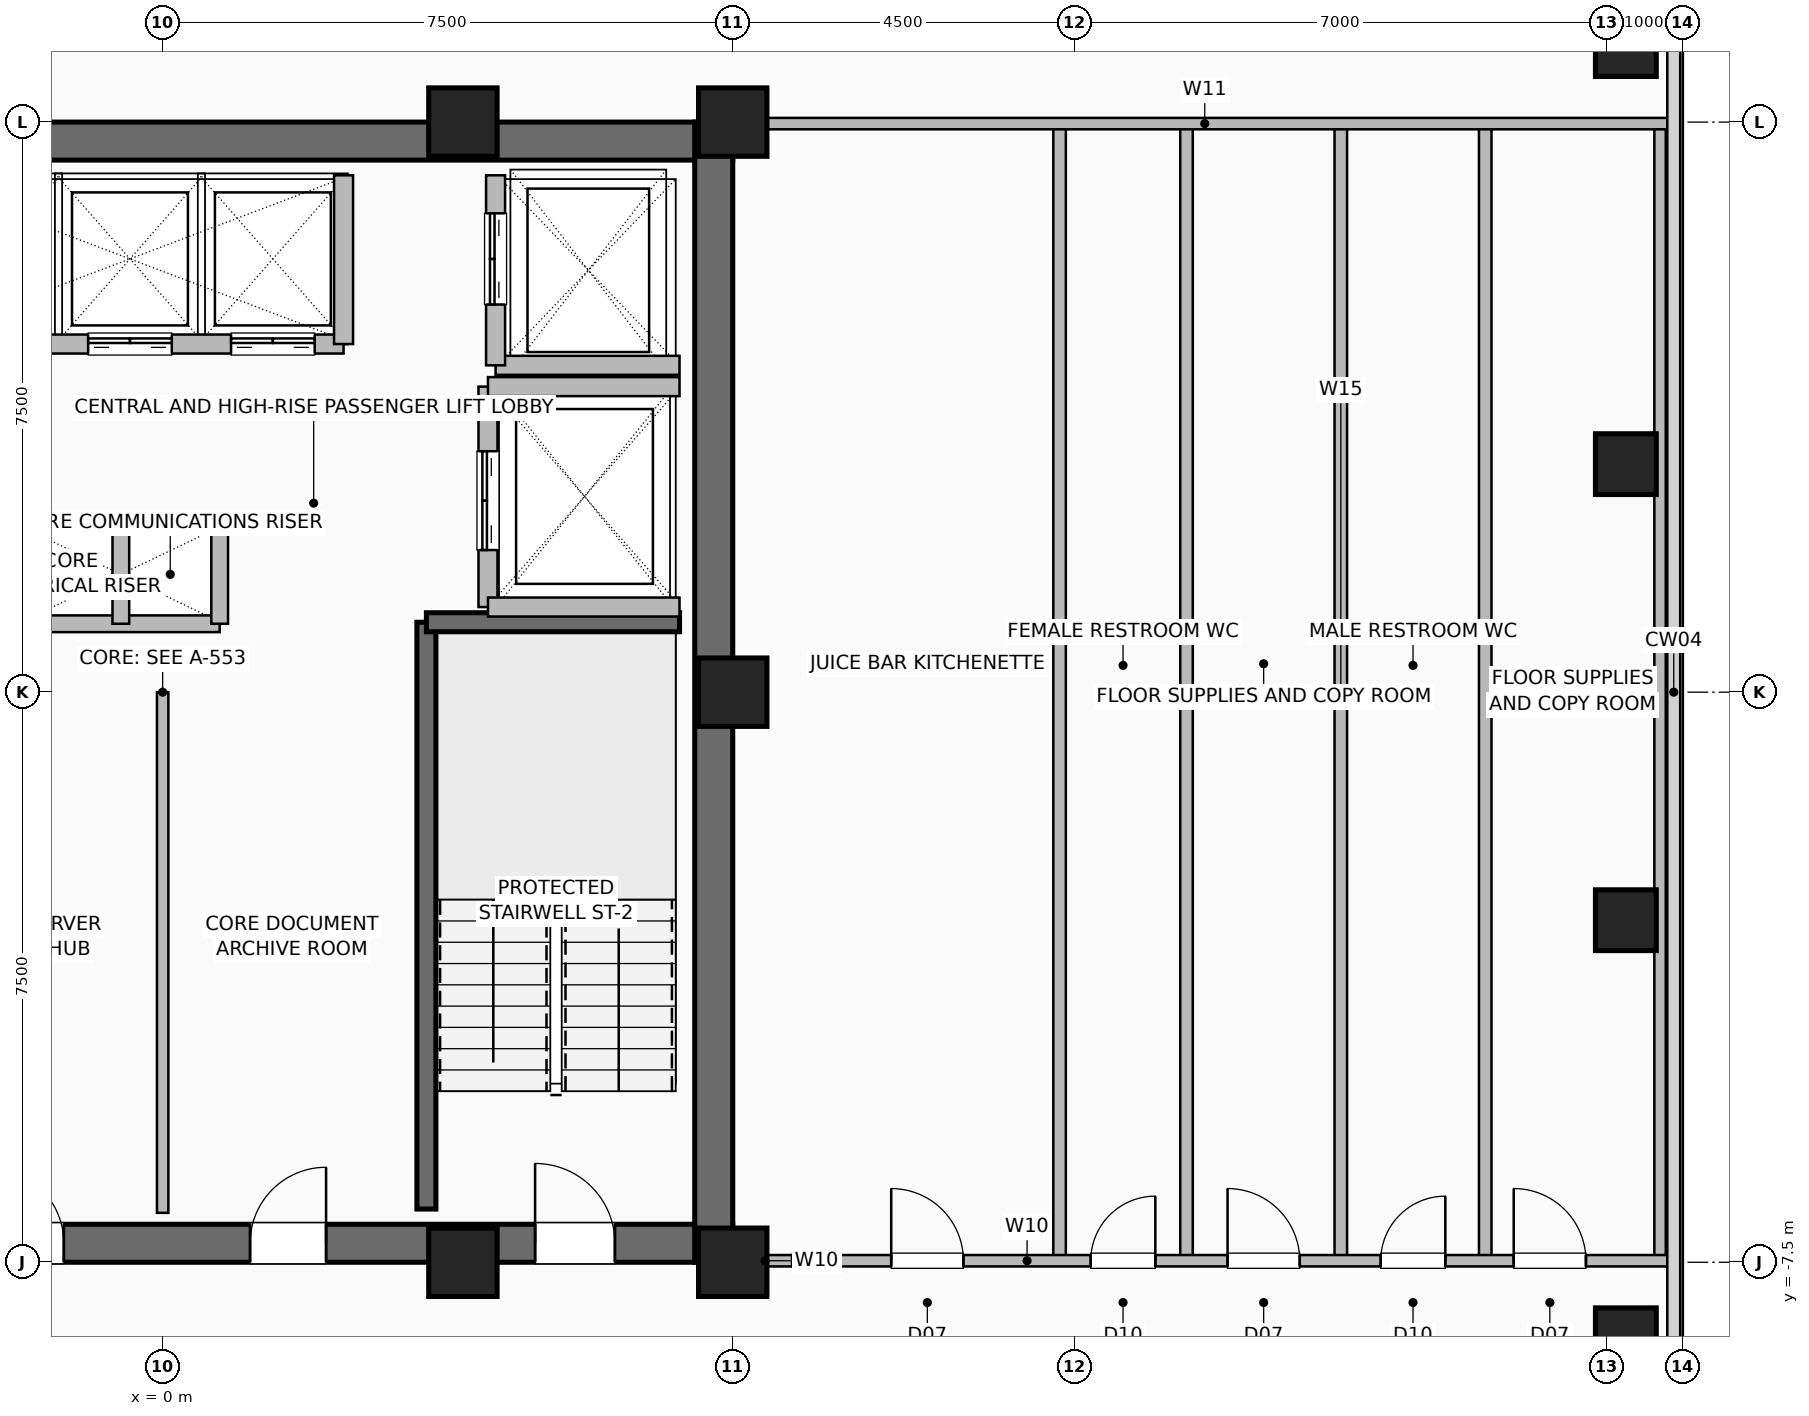
"""IFC4 building model, lengths in metres.
Left out: names, types, materials, properties, quantities, classifications, styles, units other than length and angle.
Written with IfcOpenShell. Run it as: python <this file> out.ifc"""

import sys

from ifc_helpers import new_model, si_unit, direction, frame, frame_2d, origin, origin_2d, place, context, subcontext, project, spatial, rectangle, hollow_rectangle, extrude, element, fill, save


model = new_model("IFC4")
c1 = context("Model", 3, precision=1e-05, world=origin(), true_north=direction((0.0, 1.0)))
c2 = subcontext(c1, "Body", "Model", "MODEL_VIEW")
j1 = project(units=[si_unit("LENGTHUNIT", "METRE"), si_unit("PLANEANGLEUNIT", "RADIAN")], contexts=[c1])
p1 = place(None, origin())
s1 = spatial("IfcSite", under=j1, at=p1, CompositionType="ELEMENT")
p2 = place(p1, origin())
s2 = spatial("IfcBuilding", under=s1, at=p2, CompositionType="ELEMENT")
p3 = place(p2, frame((0.0, 0.0, 209.4)))
s3 = spatial("IfcBuildingStorey", under=s2, at=p3, CompositionType="ELEMENT", Elevation=209.4)
for number, where, z_axis, x_axis in (
    (1, (3.95, -7.5, 0.0), (0.0, 0.0, 1.0), (1.0, 0.0, 0.0)),
    (2, (7.5, -7.5, 0.0), (0.0, 0.0, 1.0), (1.0, 0.0, 0.0)),
    (3, (7.5, 0.0, 0.0), (0.0, 0.0, 1.0), (1.0, 0.0, 0.0)),
    (4, (7.5, 7.5, 0.0), (0.0, 0.0, 1.0), (1.0, 0.0, 0.0)),
    (5, (3.95, 7.5, 0.0), (0.0, 0.0, 1.0), (1.0, 0.0, 0.0)),
):
    element("IfcColumn", number, at=place(p3, frame(where, z_axis=z_axis, x_axis=x_axis)), inside=s3, PredefinedType="COLUMN", context=c2, shape_type="SweptSolid", body=[
        extrude(hollow_rectangle(XDim=0.9, YDim=0.9, WallThickness=0.045, at=origin_2d()), origin(), (0.0, 0.0, 1.0), 3.6),
    ])
for number, where, z_axis, x_axis in (
    (6, (19.25, -8.5, 0.0), (0.0, 0.0, 1.0), (1.0, 0.0, 0.0)),
    (7, (19.25, -3.0, 0.0), (0.0, 0.0, 1.0), (1.0, 0.0, 0.0)),
    (8, (19.25, 3.0, 0.0), (0.0, 0.0, 1.0), (1.0, 0.0, 0.0)),
    (9, (19.25, 8.5, 0.0), (0.0, 0.0, 1.0), (1.0, 0.0, 0.0)),
):
    element("IfcColumn", number, at=place(p3, frame(where, z_axis=z_axis, x_axis=x_axis)), inside=s3, PredefinedType="COLUMN", context=c2, shape_type="SweptSolid", body=[
        extrude(hollow_rectangle(XDim=0.8, YDim=0.8, WallThickness=0.04, at=origin_2d()), origin(), (0.0, 0.0, 1.0), 3.6),
    ])
p4 = place(p3, frame((-7.5, -7.25, 0.0), z_axis=(0.0, 0.0, 1.0), x_axis=(1.0, 0.0, 0.0)))
e10 = element("IfcWall", 10, at=p4, inside=s3, PredefinedType="SHEAR", context=c2, shape_type="SweptSolid", body=[
    extrude(rectangle(XDim=15.0, YDim=0.5, at=frame_2d((7.5, 0.0))), origin(), (0.0, 0.0, 1.0), 3.36),
])
p5 = place(p4, frame((1.55, 0.0, 0.0)))
e11 = element("IfcOpeningElement", 11, at=p5, cuts=e10, PredefinedType="OPENING", context=c2, shape_type="SweptSolid", body=[
    extrude(rectangle(XDim=1.05, YDim=2.08, at=frame_2d((0.525, 1.04))), frame((0.0, 0.26, 0.0), z_axis=(0.0, -1.0, 0.0), x_axis=(1.0, 0.0, 0.0)), (0.0, 0.0, 1.0), 0.52),
])
p6 = place(p4, frame((12.4, 0.0, 0.0)))
e12 = element("IfcOpeningElement", 12, at=p6, cuts=e10, PredefinedType="OPENING", context=c2, shape_type="SweptSolid", body=[
    extrude(rectangle(XDim=1.05, YDim=2.08, at=frame_2d((0.525, 1.04))), frame((0.0, 0.26, 0.0), z_axis=(0.0, -1.0, 0.0), x_axis=(1.0, 0.0, 0.0)), (0.0, 0.0, 1.0), 0.52),
])
p7 = place(p4, frame((5.2, 0.0, 0.0)))
e13 = element("IfcOpeningElement", 13, at=p7, cuts=e10, PredefinedType="OPENING", context=c2, shape_type="SweptSolid", body=[
    extrude(rectangle(XDim=1.0, YDim=2.08, at=frame_2d((0.5, 1.04))), frame((0.0, 0.26, 0.0), z_axis=(0.0, -1.0, 0.0), x_axis=(1.0, 0.0, 0.0)), (0.0, 0.0, 1.0), 0.52),
])
p8 = place(p4, frame((8.65, 0.0, 0.0)))
e14 = element("IfcOpeningElement", 14, at=p8, cuts=e10, PredefinedType="OPENING", context=c2, shape_type="SweptSolid", body=[
    extrude(rectangle(XDim=1.0, YDim=2.08, at=frame_2d((0.5, 1.04))), frame((0.0, 0.26, 0.0), z_axis=(0.0, -1.0, 0.0), x_axis=(1.0, 0.0, 0.0)), (0.0, 0.0, 1.0), 0.52),
])
for number, where, z_axis, x_axis in (
    (15, (-7.5, 7.25, 0.0), (0.0, 0.0, 1.0), (1.0, 0.0, 0.0)),
    (16, (7.25, -7.5, 0.0), (0.0, 0.0, 1.0), (0.0, 1.0, 0.0)),
):
    element("IfcWall", number, at=place(p3, frame(where, z_axis=z_axis, x_axis=x_axis)), inside=s3, PredefinedType="SHEAR", context=c2, shape_type="SweptSolid", body=[
        extrude(rectangle(XDim=15.0, YDim=0.5, at=frame_2d((7.5, 0.0))), origin(), (0.0, 0.0, 1.0), 3.36),
    ])
p9 = place(p3, frame((3.47, -6.8, 0.0), z_axis=(0.0, 0.0, 1.0), x_axis=(0.0, 1.0, 0.0)))
e17 = element("IfcWall", 17, at=p9, inside=s3, PredefinedType="SHEAR", context=c2, shape_type="SweptSolid", body=[
    extrude(rectangle(XDim=7.72, YDim=0.25, at=frame_2d((3.86, 0.0))), origin(), (0.0, 0.0, 1.0), 3.36),
])
p10 = place(p3, frame((3.47, 0.92, 0.0), z_axis=(0.0, 0.0, 1.0), x_axis=(1.0, 0.0, 0.0)))
e18 = element("IfcWall", 18, at=p10, inside=s3, PredefinedType="SHEAR", context=c2, shape_type="SweptSolid", body=[
    extrude(rectangle(XDim=3.33, YDim=0.25, at=frame_2d((1.665, 0.0))), origin(), (0.0, 0.0, 1.0), 3.36),
])
for number, where, z_axis, x_axis in (
    (19, (-1.85, 2.2, 0.0), (0.0, 0.0, 1.0), (1.0, 0.0, 0.0)),
    (20, (-1.85, 0.9, 0.0), (0.0, 0.0, 1.0), (1.0, 0.0, 0.0)),
):
    element("IfcWall", number, at=place(p3, frame(where, z_axis=z_axis, x_axis=x_axis)), inside=s3, PredefinedType="PARTITIONING", context=c2, shape_type="SweptSolid", body=[
        extrude(rectangle(XDim=2.6, YDim=0.22, at=frame_2d((1.3, 0.0))), origin(), (0.0, 0.0, 1.0), 3.36),
    ])
for number, where, z_axis, x_axis in (
    (21, (-0.55, 0.9, 0.0), (0.0, 0.0, 1.0), (0.0, 1.0, 0.0)),
    (22, (0.75, 0.9, 0.0), (0.0, 0.0, 1.0), (0.0, 1.0, 0.0)),
):
    element("IfcWall", number, at=place(p3, frame(where, z_axis=z_axis, x_axis=x_axis)), inside=s3, PredefinedType="PARTITIONING", context=c2, shape_type="SweptSolid", body=[
        extrude(rectangle(XDim=1.3, YDim=0.22, at=frame_2d((0.65, 0.0))), origin(), (0.0, 0.0, 1.0), 3.36),
    ])
p11 = place(p3, frame((-3.26, 4.58, 0.0), z_axis=(0.0, 0.0, 1.0), x_axis=(1.0, 0.0, 0.0)))
e23 = element("IfcWall", 23, at=p11, inside=s3, PredefinedType="SHEAR", context=c2, shape_type="SweptSolid", body=[
    extrude(rectangle(XDim=5.64, YDim=0.25, at=frame_2d((2.82, 0.0))), origin(), (0.0, 0.0, 1.0), 3.36),
])
p12 = place(p11, frame((0.4, 0.0, 0.0)))
e24 = element("IfcOpeningElement", 24, at=p12, cuts=e23, PredefinedType="OPENING", context=c2, shape_type="SweptSolid", body=[
    extrude(rectangle(XDim=1.1, YDim=2.2, at=frame_2d((0.55, 1.1))), frame((0.0, 0.135, 0.0), z_axis=(0.0, -1.0, 0.0), x_axis=(1.0, 0.0, 0.0)), (0.0, 0.0, 1.0), 0.27),
])
p13 = place(p11, frame((2.28, 0.0, 0.0)))
e25 = element("IfcOpeningElement", 25, at=p13, cuts=e23, PredefinedType="OPENING", context=c2, shape_type="SweptSolid", body=[
    extrude(rectangle(XDim=1.1, YDim=2.2, at=frame_2d((0.55, 1.1))), frame((0.0, 0.135, 0.0), z_axis=(0.0, -1.0, 0.0), x_axis=(1.0, 0.0, 0.0)), (0.0, 0.0, 1.0), 0.27),
])
p14 = place(p11, frame((4.16, 0.0, 0.0)))
e26 = element("IfcOpeningElement", 26, at=p14, cuts=e23, PredefinedType="OPENING", context=c2, shape_type="SweptSolid", body=[
    extrude(rectangle(XDim=1.1, YDim=2.2, at=frame_2d((0.55, 1.1))), frame((0.0, 0.135, 0.0), z_axis=(0.0, -1.0, 0.0), x_axis=(1.0, 0.0, 0.0)), (0.0, 0.0, 1.0), 0.27),
])
p15 = place(p3, frame((2.38, 4.58, 0.0), z_axis=(0.0, 0.0, 1.0), x_axis=(0.0, 1.0, 0.0)))
e27 = element("IfcWall", 27, at=p15, inside=s3, PredefinedType="SHEAR", context=c2, shape_type="SweptSolid", body=[
    extrude(rectangle(XDim=2.22, YDim=0.25, at=frame_2d((1.11, 0.0))), origin(), (0.0, 0.0, 1.0), 3.36),
])
p16 = place(p3, frame((4.38, 4.3, 0.0), z_axis=(0.0, 0.0, 1.0), x_axis=(1.0, 0.0, 0.0)))
e28 = element("IfcWall", 28, at=p16, inside=s3, PredefinedType="SHEAR", context=c2, shape_type="SweptSolid", body=[
    extrude(rectangle(XDim=2.42, YDim=0.25, at=frame_2d((1.21, 0.0))), origin(), (0.0, 0.0, 1.0), 3.36),
])
p17 = place(p3, frame((4.38, 4.3, 0.0), z_axis=(0.0, 0.0, 1.0), x_axis=(0.0, 1.0, 0.0)))
e29 = element("IfcWall", 29, at=p17, inside=s3, PredefinedType="SHEAR", context=c2, shape_type="SweptSolid", body=[
    extrude(rectangle(XDim=2.5, YDim=0.25, at=frame_2d((1.25, 0.0))), origin(), (0.0, 0.0, 1.0), 3.36),
])
p18 = place(p17, frame((0.8, 0.0, 0.0)))
e30 = element("IfcOpeningElement", 30, at=p18, cuts=e29, PredefinedType="OPENING", context=c2, shape_type="SweptSolid", body=[
    extrude(rectangle(XDim=1.2, YDim=2.2, at=frame_2d((0.6, 1.1))), frame((0.0, 0.135, 0.0), z_axis=(0.0, -1.0, 0.0), x_axis=(1.0, 0.0, 0.0)), (0.0, 0.0, 1.0), 0.27),
])
p19 = place(p3, frame((4.28, 1.12, 0.0), z_axis=(0.0, 0.0, 1.0), x_axis=(0.0, 1.0, 0.0)))
e31 = element("IfcWall", 31, at=p19, inside=s3, PredefinedType="SHEAR", context=c2, shape_type="SweptSolid", body=[
    extrude(rectangle(XDim=2.9, YDim=0.25, at=frame_2d((1.45, 0.0))), origin(), (0.0, 0.0, 1.0), 3.36),
])
p20 = place(p19, frame((0.75, 0.0, 0.0)))
e32 = element("IfcOpeningElement", 32, at=p20, cuts=e31, PredefinedType="OPENING", context=c2, shape_type="SweptSolid", body=[
    extrude(rectangle(XDim=1.3, YDim=2.3, at=frame_2d((0.65, 1.15))), frame((0.0, 0.135, 0.0), z_axis=(0.0, -1.0, 0.0), x_axis=(1.0, 0.0, 0.0)), (0.0, 0.0, 1.0), 0.27),
])
for number, where, z_axis, x_axis in (
    (33, (4.28, 1.12, 0.0), (0.0, 0.0, 1.0), (1.0, 0.0, 0.0)),
    (34, (4.28, 4.02, 0.0), (0.0, 0.0, 1.0), (1.0, 0.0, 0.0)),
):
    element("IfcWall", number, at=place(p3, frame(where, z_axis=z_axis, x_axis=x_axis)), inside=s3, PredefinedType="SHEAR", context=c2, shape_type="SweptSolid", body=[
        extrude(rectangle(XDim=2.52, YDim=0.25, at=frame_2d((1.26, 0.0))), origin(), (0.0, 0.0, 1.0), 3.36),
    ])
p21 = place(p3, frame((0.0, -6.85, 0.0), z_axis=(0.0, 0.0, 1.0), x_axis=(0.0, 1.0, 0.0)))
e35 = element("IfcWall", 35, at=p21, inside=s3, PredefinedType="PARTITIONING", context=c2, shape_type="SweptSolid", body=[
    extrude(rectangle(XDim=6.85, YDim=0.15, at=frame_2d((3.425, 0.0))), origin(), (0.0, 0.0, 1.0), 3.36),
])
p22 = place(p3, frame((7.45, -7.48, 0.0), z_axis=(0.0, 0.0, 1.0), x_axis=(1.0, 0.0, 0.0)))
e36 = element("IfcWall", 36, at=p22, inside=s3, PredefinedType="PARTITIONING", context=c2, shape_type="SweptSolid", body=[
    extrude(rectangle(XDim=0.95, YDim=0.15, at=frame_2d((0.475, 0.0))), origin(), (0.0, 0.0, 1.0), 3.36),
])
p23 = place(p3, frame((13.47, -7.48, 0.0), z_axis=(0.0, 0.0, 1.0), x_axis=(0.0, 1.0, 0.0)))
e37 = element("IfcWall", 37, at=p23, inside=s3, PredefinedType="PLUMBINGWALL", context=c2, shape_type="SweptSolid", body=[
    extrude(rectangle(XDim=14.9, YDim=0.165, at=frame_2d((7.45, 0.0))), origin(), (0.0, 0.0, 1.0), 2.981),
])
for number, where, z_axis, x_axis in (
    (38, (17.4, -7.48, 0.0), (0.0, 0.0, 1.0), (0.0, 1.0, 0.0)),
    (39, (11.8, -7.48, 0.0), (0.0, 0.0, 1.0), (0.0, 1.0, 0.0)),
    (40, (15.5, -7.48, 0.0), (0.0, 0.0, 1.0), (0.0, 1.0, 0.0)),
):
    element("IfcWall", number, at=place(p3, frame(where, z_axis=z_axis, x_axis=x_axis)), inside=s3, PredefinedType="PLUMBINGWALL", context=c2, shape_type="SweptSolid", body=[
        extrude(rectangle(XDim=14.9, YDim=0.165, at=frame_2d((7.45, 0.0))), origin(), (0.0, 0.0, 1.0), 3.36),
    ])
p24 = place(p3, frame((19.7, -7.48, 0.0), z_axis=(0.0, 0.0, 1.0), x_axis=(0.0, 1.0, 0.0)))
e41 = element("IfcWall", 41, at=p24, inside=s3, PredefinedType="PARTITIONING", context=c2, shape_type="SweptSolid", body=[
    extrude(rectangle(XDim=14.9, YDim=0.15, at=frame_2d((7.45, 0.0))), origin(), (0.0, 0.0, 1.0), 3.36),
])
p25 = place(p3, frame((8.28, -7.48, 0.0), z_axis=(0.0, 0.0, 1.0), x_axis=(1.0, 0.0, 0.0)))
e42 = element("IfcWall", 42, at=p25, inside=s3, PredefinedType="PARTITIONING", context=c2, shape_type="SweptSolid", body=[
    extrude(rectangle(XDim=11.54, YDim=0.15, at=frame_2d((5.77, 0.0))), origin(), (0.0, 0.0, 1.0), 3.36),
])
p26 = place(p25, frame((1.305, 0.0, 0.0)))
e43 = element("IfcOpeningElement", 43, at=p26, cuts=e42, PredefinedType="OPENING", context=c2, shape_type="SweptSolid", body=[
    extrude(rectangle(XDim=0.95, YDim=2.06, at=frame_2d((0.475, 1.03))), frame((0.0, 0.085, 0.0), z_axis=(0.0, -1.0, 0.0), x_axis=(1.0, 0.0, 0.0)), (0.0, 0.0, 1.0), 0.17),
])
p27 = place(p25, frame((3.93, 0.0, 0.0)))
e44 = element("IfcOpeningElement", 44, at=p27, cuts=e42, PredefinedType="OPENING", context=c2, shape_type="SweptSolid", body=[
    extrude(rectangle(XDim=0.85, YDim=2.05, at=frame_2d((0.425, 1.025))), frame((0.0, 0.085, 0.0), z_axis=(0.0, -1.0, 0.0), x_axis=(1.0, 0.0, 0.0)), (0.0, 0.0, 1.0), 0.17),
])
p28 = place(p25, frame((5.73, 0.0, 0.0)))
e45 = element("IfcOpeningElement", 45, at=p28, cuts=e42, PredefinedType="OPENING", context=c2, shape_type="SweptSolid", body=[
    extrude(rectangle(XDim=0.95, YDim=2.06, at=frame_2d((0.475, 1.03))), frame((0.0, 0.085, 0.0), z_axis=(0.0, -1.0, 0.0), x_axis=(1.0, 0.0, 0.0)), (0.0, 0.0, 1.0), 0.17),
])
p29 = place(p25, frame((7.745, 0.0, 0.0)))
e46 = element("IfcOpeningElement", 46, at=p29, cuts=e42, PredefinedType="OPENING", context=c2, shape_type="SweptSolid", body=[
    extrude(rectangle(XDim=0.85, YDim=2.05, at=frame_2d((0.425, 1.025))), frame((0.0, 0.085, 0.0), z_axis=(0.0, -1.0, 0.0), x_axis=(1.0, 0.0, 0.0)), (0.0, 0.0, 1.0), 0.17),
])
p30 = place(p25, frame((9.495, 0.0, 0.0)))
e47 = element("IfcOpeningElement", 47, at=p30, cuts=e42, PredefinedType="OPENING", context=c2, shape_type="SweptSolid", body=[
    extrude(rectangle(XDim=0.95, YDim=2.06, at=frame_2d((0.475, 1.03))), frame((0.0, 0.085, 0.0), z_axis=(0.0, -1.0, 0.0), x_axis=(1.0, 0.0, 0.0)), (0.0, 0.0, 1.0), 0.17),
])
p31 = place(p3, frame((7.6, 7.48, 0.0), z_axis=(0.0, 0.0, 1.0), x_axis=(1.0, 0.0, 0.0)))
e48 = element("IfcWall", 48, at=p31, inside=s3, PredefinedType="PARTITIONING", context=c2, shape_type="SweptSolid", body=[
    extrude(rectangle(XDim=12.22, YDim=0.15, at=frame_2d((6.11, 0.0))), origin(), (0.0, 0.0, 1.0), 3.36),
])
p32 = place(p6, origin())
e49 = element("IfcDoor", 49, at=p32, inside=s3, OperationType="SINGLE_SWING_LEFT", PredefinedType="DOOR", context=c2, shape_type="SweptSolid", body=[
    extrude(rectangle(XDim=1.05, YDim=2.08, at=frame_2d((0.525, 1.04))), frame((0.0, 0.025, 0.0), z_axis=(0.0, -1.0, 0.0), x_axis=(1.0, 0.0, 0.0)), (0.0, 0.0, 1.0), 0.05),
])
fill(e12, e49)
p33 = place(p7, origin())
e50 = element("IfcDoor", 50, at=p33, inside=s3, OperationType="SINGLE_SWING_LEFT", PredefinedType="DOOR", context=c2, shape_type="SweptSolid", body=[
    extrude(rectangle(XDim=1.0, YDim=2.08, at=frame_2d((0.5, 1.04))), frame((0.0, 0.025, 0.0), z_axis=(0.0, -1.0, 0.0), x_axis=(1.0, 0.0, 0.0)), (0.0, 0.0, 1.0), 0.05),
])
fill(e13, e50)
p34 = place(p8, origin())
e51 = element("IfcDoor", 51, at=p34, inside=s3, OperationType="SINGLE_SWING_RIGHT", PredefinedType="DOOR", context=c2, shape_type="SweptSolid", body=[
    extrude(rectangle(XDim=1.0, YDim=2.08, at=frame_2d((0.5, 1.04))), frame((0.0, 0.025, 0.0), z_axis=(0.0, -1.0, 0.0), x_axis=(1.0, 0.0, 0.0)), (0.0, 0.0, 1.0), 0.05),
])
fill(e14, e51)
p35 = place(p13, origin())
e52 = element("IfcDoor", 52, at=p35, inside=s3, OperationType="DOUBLE_DOOR_SLIDING", PredefinedType="DOOR", context=c2, shape_type="SweptSolid", body=[
    extrude(rectangle(XDim=1.1, YDim=2.2, at=frame_2d((0.55, 1.1))), frame((0.0, 0.025, 0.0), z_axis=(0.0, -1.0, 0.0), x_axis=(1.0, 0.0, 0.0)), (0.0, 0.0, 1.0), 0.05),
])
fill(e25, e52)
p36 = place(p14, origin())
e53 = element("IfcDoor", 53, at=p36, inside=s3, OperationType="DOUBLE_DOOR_SLIDING", PredefinedType="DOOR", context=c2, shape_type="SweptSolid", body=[
    extrude(rectangle(XDim=1.1, YDim=2.2, at=frame_2d((0.55, 1.1))), frame((0.0, 0.025, 0.0), z_axis=(0.0, -1.0, 0.0), x_axis=(1.0, 0.0, 0.0)), (0.0, 0.0, 1.0), 0.05),
])
fill(e26, e53)
p37 = place(p18, origin())
e54 = element("IfcDoor", 54, at=p37, inside=s3, OperationType="DOUBLE_DOOR_SLIDING", PredefinedType="DOOR", context=c2, shape_type="SweptSolid", body=[
    extrude(rectangle(XDim=1.2, YDim=2.2, at=frame_2d((0.6, 1.1))), frame((0.0, 0.025, 0.0), z_axis=(0.0, -1.0, 0.0), x_axis=(1.0, 0.0, 0.0)), (0.0, 0.0, 1.0), 0.05),
])
fill(e30, e54)
p38 = place(p20, origin())
e55 = element("IfcDoor", 55, at=p38, inside=s3, OperationType="DOUBLE_DOOR_SLIDING", PredefinedType="DOOR", context=c2, shape_type="SweptSolid", body=[
    extrude(rectangle(XDim=1.3, YDim=2.3, at=frame_2d((0.65, 1.15))), frame((0.0, 0.025, 0.0), z_axis=(0.0, -1.0, 0.0), x_axis=(1.0, 0.0, 0.0)), (0.0, 0.0, 1.0), 0.05),
])
fill(e32, e55)
p39 = place(p26, origin())
e56 = element("IfcDoor", 56, at=p39, inside=s3, OperationType="SINGLE_SWING_LEFT", PredefinedType="DOOR", context=c2, shape_type="SweptSolid", body=[
    extrude(rectangle(XDim=0.95, YDim=2.06, at=frame_2d((0.475, 1.03))), frame((0.0, 0.025, 0.0), z_axis=(0.0, -1.0, 0.0), x_axis=(1.0, 0.0, 0.0)), (0.0, 0.0, 1.0), 0.05),
])
fill(e43, e56)
p40 = place(p27, origin())
e57 = element("IfcDoor", 57, at=p40, inside=s3, OperationType="SINGLE_SWING_RIGHT", PredefinedType="DOOR", context=c2, shape_type="SweptSolid", body=[
    extrude(rectangle(XDim=0.85, YDim=2.05, at=frame_2d((0.425, 1.025))), frame((0.0, 0.025, 0.0), z_axis=(0.0, -1.0, 0.0), x_axis=(1.0, 0.0, 0.0)), (0.0, 0.0, 1.0), 0.05),
])
fill(e44, e57)
p41 = place(p28, origin())
e58 = element("IfcDoor", 58, at=p41, inside=s3, OperationType="SINGLE_SWING_LEFT", PredefinedType="DOOR", context=c2, shape_type="SweptSolid", body=[
    extrude(rectangle(XDim=0.95, YDim=2.06, at=frame_2d((0.475, 1.03))), frame((0.0, 0.025, 0.0), z_axis=(0.0, -1.0, 0.0), x_axis=(1.0, 0.0, 0.0)), (0.0, 0.0, 1.0), 0.05),
])
fill(e45, e58)
p42 = place(p29, origin())
e59 = element("IfcDoor", 59, at=p42, inside=s3, OperationType="SINGLE_SWING_RIGHT", PredefinedType="DOOR", context=c2, shape_type="SweptSolid", body=[
    extrude(rectangle(XDim=0.85, YDim=2.05, at=frame_2d((0.425, 1.025))), frame((0.0, 0.025, 0.0), z_axis=(0.0, -1.0, 0.0), x_axis=(1.0, 0.0, 0.0)), (0.0, 0.0, 1.0), 0.05),
])
fill(e46, e59)
p43 = place(p30, origin())
e60 = element("IfcDoor", 60, at=p43, inside=s3, OperationType="SINGLE_SWING_LEFT", PredefinedType="DOOR", context=c2, shape_type="SweptSolid", body=[
    extrude(rectangle(XDim=0.95, YDim=2.06, at=frame_2d((0.475, 1.03))), frame((0.0, 0.025, 0.0), z_axis=(0.0, -1.0, 0.0), x_axis=(1.0, 0.0, 0.0)), (0.0, 0.0, 1.0), 0.05),
])
fill(e47, e60)
save(model, sys.argv[1])
